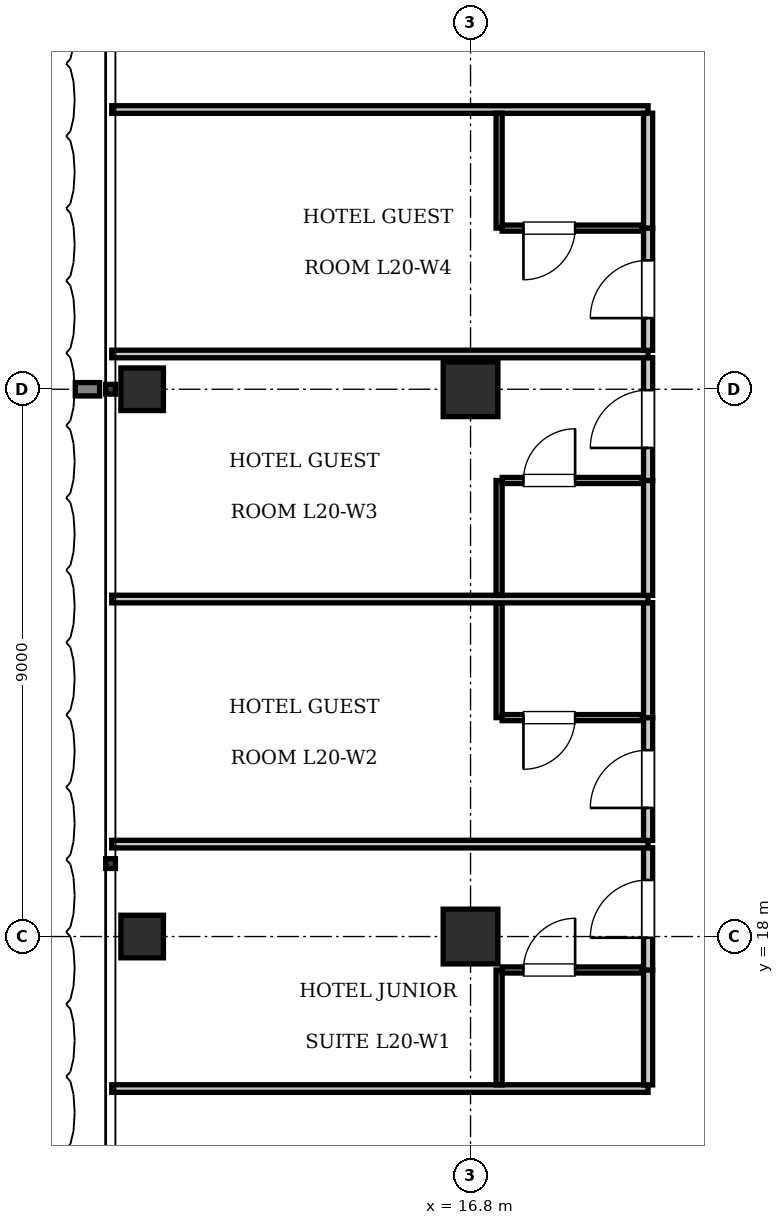
"""IFC4 building model, lengths in metres.
Left out: names, types, materials, properties, quantities, classifications, styles, units other than length and angle.
Written with IfcOpenShell. Run it as: python <this file> out.ifc"""

import sys

from ifc_helpers import new_model, si_unit, direction, frame, frame_2d, origin, origin_2d, place, context, subcontext, project, spatial, rectangle, i_section, extrude, element, fill, save


model = new_model("IFC4")
c1 = context("Model", 3, precision=1e-05, world=origin(), true_north=direction((0.0, 1.0)))
c2 = subcontext(c1, "Body", "Model", "MODEL_VIEW")
j1 = project(units=[si_unit("LENGTHUNIT", "METRE"), si_unit("PLANEANGLEUNIT", "RADIAN")], contexts=[c1])
p1 = place(None, origin())
s1 = spatial("IfcSite", under=j1, at=p1, CompositionType="ELEMENT")
p2 = place(p1, origin())
s2 = spatial("IfcBuilding", under=s1, at=p2, CompositionType="ELEMENT")
p3 = place(p2, frame((0.0, 0.0, 84.7)))
s3 = spatial("IfcBuildingStorey", under=s2, at=p3, CompositionType="ELEMENT", Elevation=84.7)
for number, where, z_axis, x_axis in (
    (1, (16.8, 18.0, 0.0), (0.0, 0.0, 1.0), (1.0, 0.0, 0.0)),
    (2, (16.8, 27.0, 0.0), (0.0, 0.0, 1.0), (1.0, 0.0, 0.0)),
):
    element("IfcColumn", number, at=place(p3, frame(where, z_axis=z_axis, x_axis=x_axis)), inside=s3, PredefinedType="COLUMN", context=c2, shape_type="SweptSolid", body=[
        extrude(rectangle(XDim=0.9, YDim=0.9, at=origin_2d()), origin(), (0.0, 0.0, 1.0), 3.85),
    ])
for number, where, z_axis, x_axis in (
    (3, (11.4, 18.0, 0.0), (0.0, 0.0, 1.0), (1.0, 0.0, 0.0)),
    (4, (11.4, 27.0, 0.0), (0.0, 0.0, 1.0), (1.0, 0.0, 0.0)),
):
    element("IfcColumn", number, at=place(p3, frame(where, z_axis=z_axis, x_axis=x_axis)), inside=s3, PredefinedType="COLUMN", context=c2, shape_type="SweptSolid", body=[
        extrude(i_section(OverallWidth=0.7, OverallDepth=0.7, WebThickness=0.028, FlangeThickness=0.044, at=origin_2d()), origin(), (0.0, 0.0, 1.0), 3.85),
    ])
for number, where, z_axis, x_axis in (
    (5, (10.9, 15.5, 0.0), (0.0, 0.0, 1.0), (1.0, 0.0, 0.0)),
    (6, (10.9, 31.6, 0.0), (0.0, 0.0, 1.0), (1.0, 0.0, 0.0)),
):
    element("IfcWall", number, at=place(p3, frame(where, z_axis=z_axis, x_axis=x_axis)), inside=s3, PredefinedType="PARTITIONING", context=c2, shape_type="SweptSolid", body=[
        extrude(rectangle(XDim=8.82, YDim=0.125, at=frame_2d((4.41, 0.0))), origin(), (0.0, 0.0, 1.0), 3.61),
    ])
p4 = place(p3, frame((19.72, 15.56, 0.0), z_axis=(0.0, 0.0, 1.0), x_axis=(0.0, 1.0, 0.0)))
e7 = element("IfcWall", 7, at=p4, inside=s3, PredefinedType="PARTITIONING", context=c2, shape_type="SweptSolid", body=[
    extrude(rectangle(XDim=1.89, YDim=0.15, at=frame_2d((0.945, 0.0))), origin(), (0.0, 0.0, 1.0), 3.61),
])
p5 = place(p3, frame((19.72, 17.45, 0.0), z_axis=(0.0, 0.0, 1.0), x_axis=(0.0, 1.0, 0.0)))
e8 = element("IfcWall", 8, at=p5, inside=s3, PredefinedType="PARTITIONING", context=c2, shape_type="SweptSolid", body=[
    extrude(rectangle(XDim=2.01, YDim=0.15, at=frame_2d((1.005, 0.0))), origin(), (0.0, 0.0, 1.0), 3.61),
])
p6 = place(p5, frame((0.53, 0.0, 0.0)))
e9 = element("IfcOpeningElement", 9, at=p6, cuts=e8, PredefinedType="OPENING", context=c2, shape_type="SweptSolid", body=[
    extrude(rectangle(XDim=0.95, YDim=2.15, at=frame_2d((0.475, 1.075))), frame((0.0, 0.085, 0.0), z_axis=(0.0, -1.0, 0.0), x_axis=(1.0, 0.0, 0.0)), (0.0, 0.0, 1.0), 0.17),
])
p7 = place(p3, frame((17.27, 15.56, 0.0), z_axis=(0.0, 0.0, 1.0), x_axis=(0.0, 1.0, 0.0)))
e10 = element("IfcWall", 10, at=p7, inside=s3, PredefinedType="PARTITIONING", context=c2, shape_type="SweptSolid", body=[
    extrude(rectangle(XDim=1.89, YDim=0.1, at=frame_2d((0.945, 0.0))), origin(), (0.0, 0.0, 1.0), 3.61),
])
p8 = place(p3, frame((17.32, 17.45, 0.0), z_axis=(0.0, 0.0, 1.0), x_axis=(1.0, 0.0, 0.0)))
e11 = element("IfcWall", 11, at=p8, inside=s3, PredefinedType="PARTITIONING", context=c2, shape_type="SweptSolid", body=[
    extrude(rectangle(XDim=2.3, YDim=0.1, at=frame_2d((1.15, 0.0))), origin(), (0.0, 0.0, 1.0), 3.61),
])
p9 = place(p8, frame((0.35, 0.0, 0.0)))
e12 = element("IfcOpeningElement", 12, at=p9, cuts=e11, PredefinedType="OPENING", context=c2, shape_type="SweptSolid", body=[
    extrude(rectangle(XDim=0.85, YDim=2.1, at=frame_2d((0.425, 1.05))), frame((0.0, 0.06, 0.0), z_axis=(0.0, -1.0, 0.0), x_axis=(1.0, 0.0, 0.0)), (0.0, 0.0, 1.0), 0.12),
])
p10 = place(p3, frame((10.9, 19.52, 0.0), z_axis=(0.0, 0.0, 1.0), x_axis=(1.0, 0.0, 0.0)))
e13 = element("IfcWall", 13, at=p10, inside=s3, PredefinedType="PARTITIONING", context=c2, shape_type="SweptSolid", body=[
    extrude(rectangle(XDim=8.82, YDim=0.125, at=frame_2d((4.41, 0.0))), origin(), (0.0, 0.0, 1.0), 3.61),
])
p11 = place(p3, frame((19.72, 19.58, 0.0), z_axis=(0.0, 0.0, 1.0), x_axis=(0.0, 1.0, 0.0)))
e14 = element("IfcWall", 14, at=p11, inside=s3, PredefinedType="PARTITIONING", context=c2, shape_type="SweptSolid", body=[
    extrude(rectangle(XDim=2.02, YDim=0.15, at=frame_2d((1.01, 0.0))), origin(), (0.0, 0.0, 1.0), 3.61),
])
p12 = place(p11, frame((0.535, 0.0, 0.0)))
e15 = element("IfcOpeningElement", 15, at=p12, cuts=e14, PredefinedType="OPENING", context=c2, shape_type="SweptSolid", body=[
    extrude(rectangle(XDim=0.95, YDim=2.15, at=frame_2d((0.475, 1.075))), frame((0.0, 0.085, 0.0), z_axis=(0.0, -1.0, 0.0), x_axis=(1.0, 0.0, 0.0)), (0.0, 0.0, 1.0), 0.17),
])
p13 = place(p3, frame((19.72, 21.6, 0.0), z_axis=(0.0, 0.0, 1.0), x_axis=(0.0, 1.0, 0.0)))
e16 = element("IfcWall", 16, at=p13, inside=s3, PredefinedType="PARTITIONING", context=c2, shape_type="SweptSolid", body=[
    extrude(rectangle(XDim=1.89, YDim=0.15, at=frame_2d((0.945, 0.0))), origin(), (0.0, 0.0, 1.0), 3.61),
])
p14 = place(p3, frame((17.27, 21.6, 0.0), z_axis=(0.0, 0.0, 1.0), x_axis=(0.0, 1.0, 0.0)))
e17 = element("IfcWall", 17, at=p14, inside=s3, PredefinedType="PARTITIONING", context=c2, shape_type="SweptSolid", body=[
    extrude(rectangle(XDim=1.89, YDim=0.1, at=frame_2d((0.945, 0.0))), origin(), (0.0, 0.0, 1.0), 3.61),
])
p15 = place(p3, frame((17.32, 21.6, 0.0), z_axis=(0.0, 0.0, 1.0), x_axis=(1.0, 0.0, 0.0)))
e18 = element("IfcWall", 18, at=p15, inside=s3, PredefinedType="PARTITIONING", context=c2, shape_type="SweptSolid", body=[
    extrude(rectangle(XDim=2.3, YDim=0.1, at=frame_2d((1.15, 0.0))), origin(), (0.0, 0.0, 1.0), 3.61),
])
p16 = place(p15, frame((0.35, 0.0, 0.0)))
e19 = element("IfcOpeningElement", 19, at=p16, cuts=e18, PredefinedType="OPENING", context=c2, shape_type="SweptSolid", body=[
    extrude(rectangle(XDim=0.85, YDim=2.1, at=frame_2d((0.425, 1.05))), frame((0.0, 0.06, 0.0), z_axis=(0.0, -1.0, 0.0), x_axis=(1.0, 0.0, 0.0)), (0.0, 0.0, 1.0), 0.12),
])
p17 = place(p3, frame((10.9, 23.55, 0.0), z_axis=(0.0, 0.0, 1.0), x_axis=(1.0, 0.0, 0.0)))
e20 = element("IfcWall", 20, at=p17, inside=s3, PredefinedType="PARTITIONING", context=c2, shape_type="SweptSolid", body=[
    extrude(rectangle(XDim=8.82, YDim=0.125, at=frame_2d((4.41, 0.0))), origin(), (0.0, 0.0, 1.0), 3.61),
])
p18 = place(p3, frame((19.72, 23.61, 0.0), z_axis=(0.0, 0.0, 1.0), x_axis=(0.0, 1.0, 0.0)))
e21 = element("IfcWall", 21, at=p18, inside=s3, PredefinedType="PARTITIONING", context=c2, shape_type="SweptSolid", body=[
    extrude(rectangle(XDim=1.89, YDim=0.15, at=frame_2d((0.945, 0.0))), origin(), (0.0, 0.0, 1.0), 3.61),
])
p19 = place(p3, frame((19.72, 25.5, 0.0), z_axis=(0.0, 0.0, 1.0), x_axis=(0.0, 1.0, 0.0)))
e22 = element("IfcWall", 22, at=p19, inside=s3, PredefinedType="PARTITIONING", context=c2, shape_type="SweptSolid", body=[
    extrude(rectangle(XDim=2.02, YDim=0.15, at=frame_2d((1.01, 0.0))), origin(), (0.0, 0.0, 1.0), 3.61),
])
p20 = place(p19, frame((0.535, 0.0, 0.0)))
e23 = element("IfcOpeningElement", 23, at=p20, cuts=e22, PredefinedType="OPENING", context=c2, shape_type="SweptSolid", body=[
    extrude(rectangle(XDim=0.95, YDim=2.15, at=frame_2d((0.475, 1.075))), frame((0.0, 0.085, 0.0), z_axis=(0.0, -1.0, 0.0), x_axis=(1.0, 0.0, 0.0)), (0.0, 0.0, 1.0), 0.17),
])
p21 = place(p3, frame((17.27, 23.61, 0.0), z_axis=(0.0, 0.0, 1.0), x_axis=(0.0, 1.0, 0.0)))
e24 = element("IfcWall", 24, at=p21, inside=s3, PredefinedType="PARTITIONING", context=c2, shape_type="SweptSolid", body=[
    extrude(rectangle(XDim=1.89, YDim=0.1, at=frame_2d((0.945, 0.0))), origin(), (0.0, 0.0, 1.0), 3.61),
])
p22 = place(p3, frame((17.32, 25.5, 0.0), z_axis=(0.0, 0.0, 1.0), x_axis=(1.0, 0.0, 0.0)))
e25 = element("IfcWall", 25, at=p22, inside=s3, PredefinedType="PARTITIONING", context=c2, shape_type="SweptSolid", body=[
    extrude(rectangle(XDim=2.3, YDim=0.1, at=frame_2d((1.15, 0.0))), origin(), (0.0, 0.0, 1.0), 3.61),
])
p23 = place(p22, frame((0.35, 0.0, 0.0)))
e26 = element("IfcOpeningElement", 26, at=p23, cuts=e25, PredefinedType="OPENING", context=c2, shape_type="SweptSolid", body=[
    extrude(rectangle(XDim=0.85, YDim=2.1, at=frame_2d((0.425, 1.05))), frame((0.0, 0.06, 0.0), z_axis=(0.0, -1.0, 0.0), x_axis=(1.0, 0.0, 0.0)), (0.0, 0.0, 1.0), 0.12),
])
p24 = place(p3, frame((10.9, 27.58, 0.0), z_axis=(0.0, 0.0, 1.0), x_axis=(1.0, 0.0, 0.0)))
e27 = element("IfcWall", 27, at=p24, inside=s3, PredefinedType="PARTITIONING", context=c2, shape_type="SweptSolid", body=[
    extrude(rectangle(XDim=8.82, YDim=0.125, at=frame_2d((4.41, 0.0))), origin(), (0.0, 0.0, 1.0), 3.61),
])
p25 = place(p3, frame((19.72, 27.64, 0.0), z_axis=(0.0, 0.0, 1.0), x_axis=(0.0, 1.0, 0.0)))
e28 = element("IfcWall", 28, at=p25, inside=s3, PredefinedType="PARTITIONING", context=c2, shape_type="SweptSolid", body=[
    extrude(rectangle(XDim=2.01, YDim=0.15, at=frame_2d((1.005, 0.0))), origin(), (0.0, 0.0, 1.0), 3.61),
])
p26 = place(p25, frame((0.53, 0.0, 0.0)))
e29 = element("IfcOpeningElement", 29, at=p26, cuts=e28, PredefinedType="OPENING", context=c2, shape_type="SweptSolid", body=[
    extrude(rectangle(XDim=0.95, YDim=2.15, at=frame_2d((0.475, 1.075))), frame((0.0, 0.085, 0.0), z_axis=(0.0, -1.0, 0.0), x_axis=(1.0, 0.0, 0.0)), (0.0, 0.0, 1.0), 0.17),
])
p27 = place(p3, frame((19.72, 29.65, 0.0), z_axis=(0.0, 0.0, 1.0), x_axis=(0.0, 1.0, 0.0)))
e30 = element("IfcWall", 30, at=p27, inside=s3, PredefinedType="PARTITIONING", context=c2, shape_type="SweptSolid", body=[
    extrude(rectangle(XDim=1.89, YDim=0.15, at=frame_2d((0.945, 0.0))), origin(), (0.0, 0.0, 1.0), 3.61),
])
p28 = place(p3, frame((17.27, 29.65, 0.0), z_axis=(0.0, 0.0, 1.0), x_axis=(0.0, 1.0, 0.0)))
e31 = element("IfcWall", 31, at=p28, inside=s3, PredefinedType="PARTITIONING", context=c2, shape_type="SweptSolid", body=[
    extrude(rectangle(XDim=1.89, YDim=0.1, at=frame_2d((0.945, 0.0))), origin(), (0.0, 0.0, 1.0), 3.61),
])
p29 = place(p3, frame((17.32, 29.65, 0.0), z_axis=(0.0, 0.0, 1.0), x_axis=(1.0, 0.0, 0.0)))
e32 = element("IfcWall", 32, at=p29, inside=s3, PredefinedType="PARTITIONING", context=c2, shape_type="SweptSolid", body=[
    extrude(rectangle(XDim=2.3, YDim=0.1, at=frame_2d((1.15, 0.0))), origin(), (0.0, 0.0, 1.0), 3.61),
])
p30 = place(p29, frame((0.35, 0.0, 0.0)))
e33 = element("IfcOpeningElement", 33, at=p30, cuts=e32, PredefinedType="OPENING", context=c2, shape_type="SweptSolid", body=[
    extrude(rectangle(XDim=0.85, YDim=2.1, at=frame_2d((0.425, 1.05))), frame((0.0, 0.06, 0.0), z_axis=(0.0, -1.0, 0.0), x_axis=(1.0, 0.0, 0.0)), (0.0, 0.0, 1.0), 0.12),
])
p31 = place(p9, origin())
e34 = element("IfcDoor", 34, at=p31, inside=s3, OperationType="SINGLE_SWING_RIGHT", PredefinedType="DOOR", context=c2, shape_type="SweptSolid", body=[
    extrude(rectangle(XDim=0.85, YDim=2.1, at=frame_2d((0.425, 1.05))), frame((0.0, 0.025, 0.0), z_axis=(0.0, -1.0, 0.0), x_axis=(1.0, 0.0, 0.0)), (0.0, 0.0, 1.0), 0.05),
])
fill(e12, e34)
p32 = place(p6, origin())
e35 = element("IfcDoor", 35, at=p32, inside=s3, OperationType="SINGLE_SWING_LEFT", PredefinedType="DOOR", context=c2, shape_type="SweptSolid", body=[
    extrude(rectangle(XDim=0.95, YDim=2.15, at=frame_2d((0.475, 1.075))), frame((0.0, 0.025, 0.0), z_axis=(0.0, -1.0, 0.0), x_axis=(1.0, 0.0, 0.0)), (0.0, 0.0, 1.0), 0.05),
])
fill(e9, e35)
p33 = place(p16, frame((0.85, 0.0, 0.0), z_axis=(0.0, 0.0, 1.0), x_axis=(-1.0, 0.0, 0.0)))
e36 = element("IfcDoor", 36, at=p33, inside=s3, OperationType="SINGLE_SWING_RIGHT", PredefinedType="DOOR", context=c2, shape_type="SweptSolid", body=[
    extrude(rectangle(XDim=0.85, YDim=2.1, at=frame_2d((0.425, 1.05))), frame((0.0, 0.025, 0.0), z_axis=(0.0, -1.0, 0.0), x_axis=(1.0, 0.0, 0.0)), (0.0, 0.0, 1.0), 0.05),
])
fill(e19, e36)
p34 = place(p12, origin())
e37 = element("IfcDoor", 37, at=p34, inside=s3, OperationType="SINGLE_SWING_LEFT", PredefinedType="DOOR", context=c2, shape_type="SweptSolid", body=[
    extrude(rectangle(XDim=0.95, YDim=2.15, at=frame_2d((0.475, 1.075))), frame((0.0, 0.025, 0.0), z_axis=(0.0, -1.0, 0.0), x_axis=(1.0, 0.0, 0.0)), (0.0, 0.0, 1.0), 0.05),
])
fill(e15, e37)
p35 = place(p23, origin())
e38 = element("IfcDoor", 38, at=p35, inside=s3, OperationType="SINGLE_SWING_RIGHT", PredefinedType="DOOR", context=c2, shape_type="SweptSolid", body=[
    extrude(rectangle(XDim=0.85, YDim=2.1, at=frame_2d((0.425, 1.05))), frame((0.0, 0.025, 0.0), z_axis=(0.0, -1.0, 0.0), x_axis=(1.0, 0.0, 0.0)), (0.0, 0.0, 1.0), 0.05),
])
fill(e26, e38)
p36 = place(p20, origin())
e39 = element("IfcDoor", 39, at=p36, inside=s3, OperationType="SINGLE_SWING_LEFT", PredefinedType="DOOR", context=c2, shape_type="SweptSolid", body=[
    extrude(rectangle(XDim=0.95, YDim=2.15, at=frame_2d((0.475, 1.075))), frame((0.0, 0.025, 0.0), z_axis=(0.0, -1.0, 0.0), x_axis=(1.0, 0.0, 0.0)), (0.0, 0.0, 1.0), 0.05),
])
fill(e23, e39)
p37 = place(p30, frame((0.85, 0.0, 0.0), z_axis=(0.0, 0.0, 1.0), x_axis=(-1.0, 0.0, 0.0)))
e40 = element("IfcDoor", 40, at=p37, inside=s3, OperationType="SINGLE_SWING_RIGHT", PredefinedType="DOOR", context=c2, shape_type="SweptSolid", body=[
    extrude(rectangle(XDim=0.85, YDim=2.1, at=frame_2d((0.425, 1.05))), frame((0.0, 0.025, 0.0), z_axis=(0.0, -1.0, 0.0), x_axis=(1.0, 0.0, 0.0)), (0.0, 0.0, 1.0), 0.05),
])
fill(e33, e40)
p38 = place(p26, origin())
e41 = element("IfcDoor", 41, at=p38, inside=s3, OperationType="SINGLE_SWING_LEFT", PredefinedType="DOOR", context=c2, shape_type="SweptSolid", body=[
    extrude(rectangle(XDim=0.95, YDim=2.15, at=frame_2d((0.475, 1.075))), frame((0.0, 0.025, 0.0), z_axis=(0.0, -1.0, 0.0), x_axis=(1.0, 0.0, 0.0)), (0.0, 0.0, 1.0), 0.05),
])
fill(e29, e41)
save(model, sys.argv[1])
